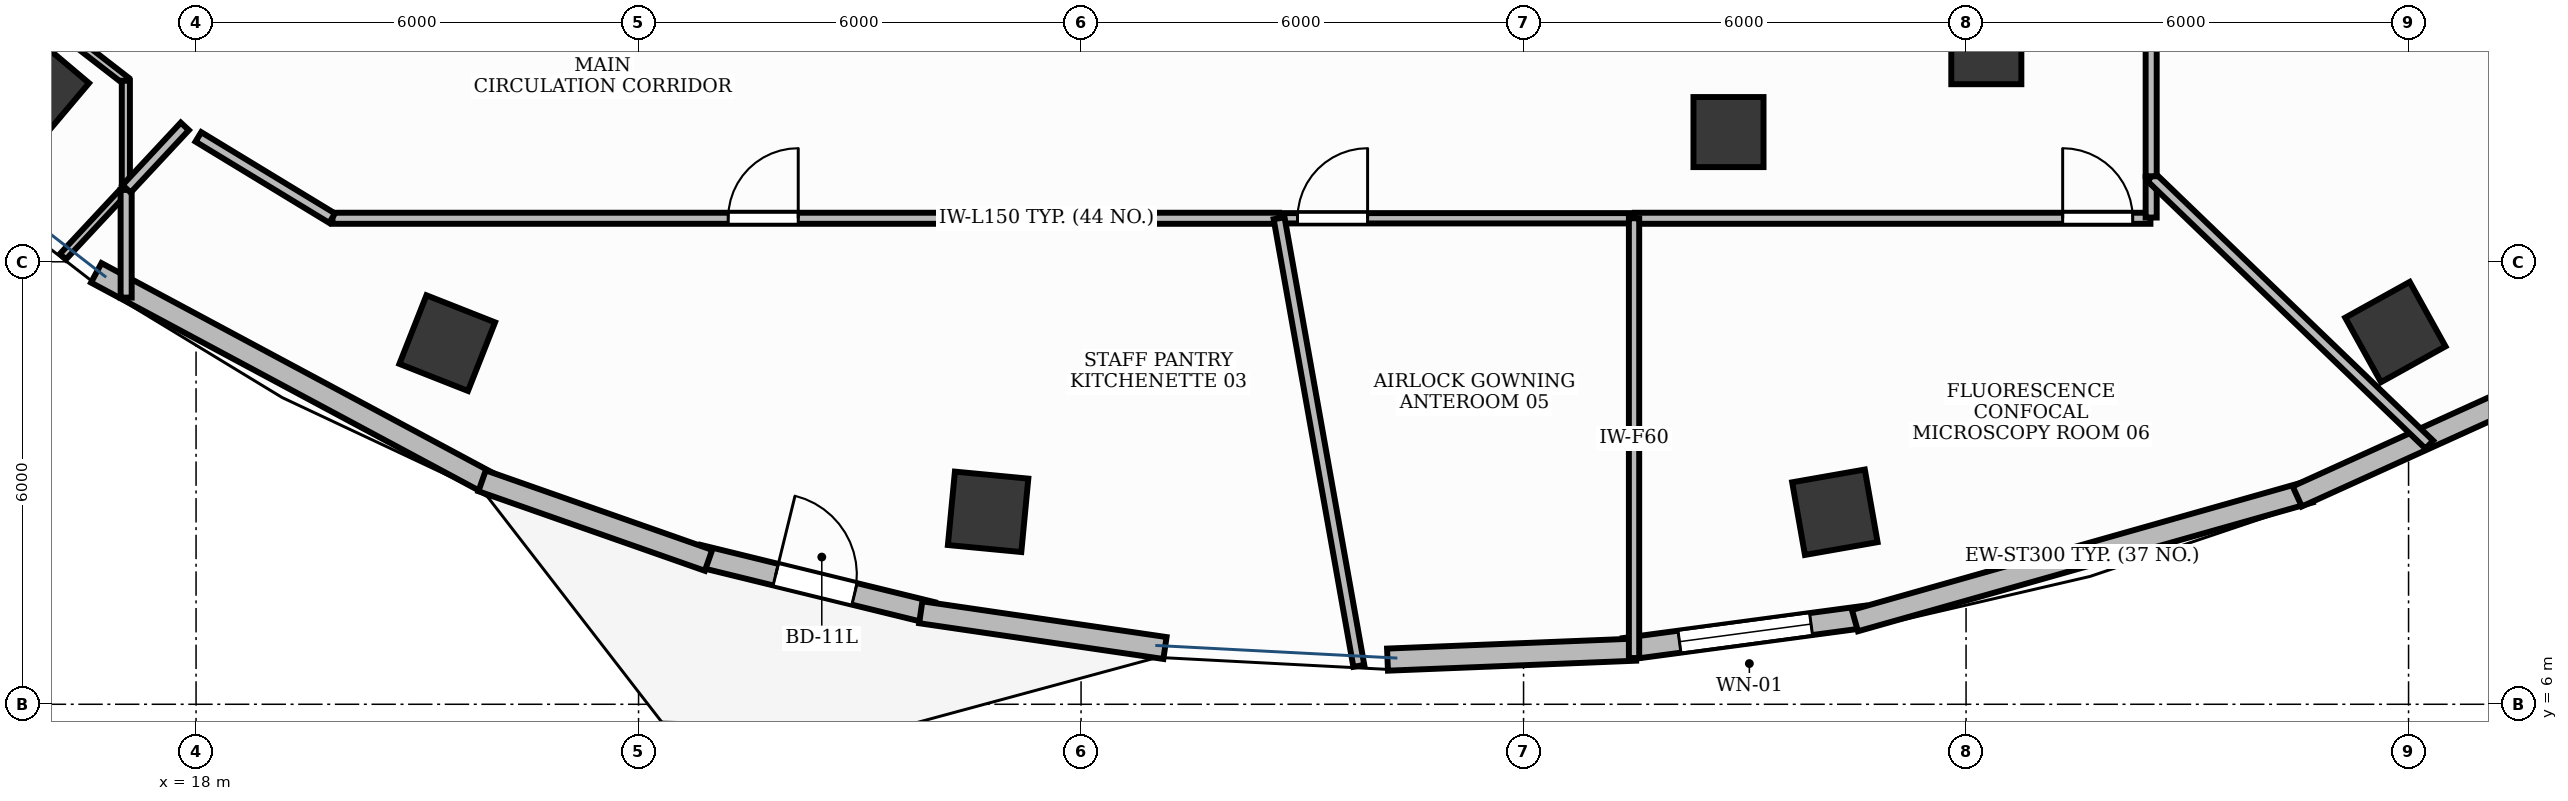
"""IFC4 building model, lengths in metres.
Left out: names, types, materials, properties, quantities, classifications, styles, units other than length and angle.
Written with IfcOpenShell. Run it as: python <this file> out.ifc"""

import sys

from ifc_helpers import new_model, si_unit, direction, frame, frame_2d, origin, origin_2d, place, context, subcontext, project, spatial, rectangle, extrude, element, fill, save


model = new_model("IFC4")
c1 = context("Model", 3, precision=1e-05, world=origin(), true_north=direction((0.0, 1.0)))
c2 = subcontext(c1, "Body", "Model", "MODEL_VIEW")
j1 = project(units=[si_unit("LENGTHUNIT", "METRE"), si_unit("PLANEANGLEUNIT", "RADIAN")], contexts=[c1])
p1 = place(None, origin())
s1 = spatial("IfcSite", under=j1, at=p1, CompositionType="ELEMENT")
p2 = place(p1, origin())
s2 = spatial("IfcBuilding", under=s1, at=p2, CompositionType="ELEMENT")
p3 = place(p2, frame((0.0, 0.0, 162.6)))
s3 = spatial("IfcBuildingStorey", under=s2, at=p3, CompositionType="ELEMENT", Elevation=162.6)
for number, where, z_axis, x_axis in (
    (1, (15.844, 14.363, -0.0), (0.0, 0.0, 1.0), (-0.764, 0.645, 0.0)),
    (2, (21.406, 10.897, -0.0), (0.0, 0.0, 1.0), (-0.93, 0.367, 0.0)),
    (3, (28.74, 8.61, -0.0), (0.0, 0.0, 1.0), (-0.995, 0.095, 0.0)),
    (4, (40.221, 8.604, -0.0), (0.0, 0.0, 1.0), (0.985, 0.173, 0.0)),
):
    element("IfcColumn", number, at=place(p3, frame(where, z_axis=z_axis, x_axis=x_axis)), inside=s3, PredefinedType="COLUMN", context=c2, shape_type="SweptSolid", body=[
        extrude(rectangle(XDim=1.0, YDim=1.0, at=origin_2d()), origin(), (0.0, 0.0, 1.0), 3.791),
    ])
p4 = place(p3, frame((38.779, 13.759, -0.0), z_axis=(0.0, 0.0, 1.0), x_axis=(1.0, 0.0, 0.0)))
e5 = element("IfcColumn", 5, at=p4, inside=s3, PredefinedType="COLUMN", context=c2, shape_type="SweptSolid", body=[
    extrude(rectangle(XDim=0.95, YDim=0.95, at=origin_2d()), origin(), (0.0, 0.0, 1.0), 3.791),
])
p5 = place(p3, frame((47.821, 11.047, -0.0), z_axis=(0.0, 0.0, 1.0), x_axis=(0.874535078577, 0.484962262797, 0.0)))
e6 = element("IfcColumn", 6, at=p5, inside=s3, PredefinedType="COLUMN", context=c2, shape_type="SweptSolid", body=[
    extrude(rectangle(XDim=1.0, YDim=1.0, at=origin_2d()), origin(), (0.0, 0.0, 1.0), 3.791),
])
p6 = place(p3, frame((42.275, 14.883, -0.0), z_axis=(0.0, 0.0, 1.0), x_axis=(1.0, 0.0, 0.0)))
e7 = element("IfcColumn", 7, at=p6, inside=s3, PredefinedType="COLUMN", context=c2, shape_type="SweptSolid", body=[
    extrude(rectangle(XDim=0.95, YDim=0.95, at=origin_2d()), origin(), (0.0, 0.0, 1.0), 3.791),
])
p7 = place(p3, frame((24.807, 8.016, 0.0), z_axis=(0.0, 0.0, 1.0), x_axis=(0.971312804689, -0.237805457142, 0.0)))
e8 = element("IfcWall", 8, at=p7, inside=s3, PredefinedType="STANDARD", context=c2, shape_type="SweptSolid", body=[
    extrude(rectangle(XDim=3.269, YDim=0.3, at=frame_2d((1.634, 0.0))), origin(), (0.0, 0.0, 1.0), 3.79),
])
p8 = place(p7, frame((1.084, 0.0, 0.0)))
e9 = element("IfcOpeningElement", 9, at=p8, cuts=e8, PredefinedType="OPENING", context=c2, shape_type="SweptSolid", body=[
    extrude(rectangle(XDim=1.1, YDim=2.15, at=frame_2d((0.55, 1.075))), frame((0.0, 0.165, 0.0), z_axis=(0.0, -1.0, 0.0), x_axis=(1.0, 0.0, 0.0)), (0.0, 0.0, 1.0), 0.33),
])
p9 = place(p3, frame((37.365, 6.748, 0.0), z_axis=(0.0, 0.0, 1.0), x_axis=(0.991139436205, 0.132825517122, 0.0)))
e10 = element("IfcWall", 10, at=p9, inside=s3, PredefinedType="STANDARD", context=c2, shape_type="SweptSolid", body=[
    extrude(rectangle(XDim=3.31, YDim=0.3, at=frame_2d((1.655, 0.0))), origin(), (0.0, 0.0, 1.0), 3.79),
])
p10 = place(p9, frame((0.755, 0.0, 0.9)))
e11 = element("IfcOpeningElement", 11, at=p10, cuts=e10, PredefinedType="OPENING", context=c2, shape_type="SweptSolid", body=[
    extrude(rectangle(XDim=1.8, YDim=2.1, at=frame_2d((0.9, 1.05))), frame((0.0, 0.165, 0.0), z_axis=(0.0, -1.0, 0.0), x_axis=(1.0, 0.0, 0.0)), (0.0, 0.0, 1.0), 0.33),
])
p11 = place(p3, frame((16.647, 11.85, 0.0), z_axis=(0.0, 0.0, 1.0), x_axis=(0.881364369565, -0.472437136624, 0.0)))
e12 = element("IfcWall", 12, at=p11, inside=s3, PredefinedType="STANDARD", context=c2, shape_type="SweptSolid", body=[
    extrude(rectangle(XDim=6.124, YDim=0.3, at=frame_2d((3.062, 0.0))), origin(), (0.0, 0.0, 1.0), 3.79),
])
p12 = place(p3, frame((21.878, 9.03, 0.0), z_axis=(0.0, 0.0, 1.0), x_axis=(0.94352100271, -0.331312718509, 0.0)))
e13 = element("IfcWall", 13, at=p12, inside=s3, PredefinedType="STANDARD", context=c2, shape_type="SweptSolid", body=[
    extrude(rectangle(XDim=3.254, YDim=0.3, at=frame_2d((1.627, 0.0))), origin(), (0.0, 0.0, 1.0), 3.79),
])
p13 = place(p3, frame((27.826, 7.247, 0.0), z_axis=(0.0, 0.0, 1.0), x_axis=(0.98945927954, -0.144811374319, 0.0)))
e14 = element("IfcWall", 14, at=p13, inside=s3, PredefinedType="STANDARD", context=c2, shape_type="SweptSolid", body=[
    extrude(rectangle(XDim=3.346, YDim=0.3, at=frame_2d((1.673, 0.0))), origin(), (0.0, 0.0, 1.0), 3.79),
])
p14 = place(p3, frame((34.155, 6.605, 0.0), z_axis=(0.0, 0.0, 1.0), x_axis=(0.999190386434, 0.040231475948, 0.0)))
e15 = element("IfcWall", 15, at=p14, inside=s3, PredefinedType="STANDARD", context=c2, shape_type="SweptSolid", body=[
    extrude(rectangle(XDim=3.368, YDim=0.3, at=frame_2d((1.684, 0.0))), origin(), (0.0, 0.0, 1.0), 3.79),
])
p15 = place(p3, frame((40.493, 7.134, 0.0), z_axis=(0.0, 0.0, 1.0), x_axis=(0.962163849422, 0.272471515694, 0.0)))
e16 = element("IfcWall", 16, at=p15, inside=s3, PredefinedType="STANDARD", context=c2, shape_type="SweptSolid", body=[
    extrude(rectangle(XDim=6.409, YDim=0.3, at=frame_2d((3.205, 0.0))), origin(), (0.0, 0.0, 1.0), 3.79),
])
p16 = place(p3, frame((46.49, 8.818, 0.0), z_axis=(0.0, 0.0, 1.0), x_axis=(0.910633193525, 0.413215666268, 0.0)))
e17 = element("IfcWall", 17, at=p16, inside=s3, PredefinedType="STANDARD", context=c2, shape_type="SweptSolid", body=[
    extrude(rectangle(XDim=3.195, YDim=0.3, at=frame_2d((1.598, 0.0))), origin(), (0.0, 0.0, 1.0), 3.79),
])
p17 = place(p3, frame((19.85, 12.59, 0.0), z_axis=(0.0, 0.0, 1.0), x_axis=(1.0, 0.0, 0.0)))
e18 = element("IfcWall", 18, at=p17, inside=s3, PredefinedType="PARTITIONING", context=c2, shape_type="SweptSolid", body=[
    extrude(rectangle(XDim=12.835, YDim=0.15, at=frame_2d((6.418, 0.0))), origin(), (0.0, 0.0, 1.0), 2.8),
])
p18 = place(p17, frame((5.365, 0.0, 0.0)))
e19 = element("IfcOpeningElement", 19, at=p18, cuts=e18, PredefinedType="OPENING", context=c2, shape_type="SweptSolid", body=[
    extrude(rectangle(XDim=0.95, YDim=2.15, at=frame_2d((0.475, 1.075))), frame((0.0, 0.09, 0.0), z_axis=(0.0, -1.0, 0.0), x_axis=(1.0, 0.0, 0.0)), (0.0, 0.0, 1.0), 0.18),
])
p19 = place(p3, frame((32.695, 12.59, 0.0), z_axis=(0.0, 0.0, 1.0), x_axis=(1.0, 0.0, 0.0)))
e20 = element("IfcWall", 20, at=p19, inside=s3, PredefinedType="PARTITIONING", context=c2, shape_type="SweptSolid", body=[
    extrude(rectangle(XDim=4.803, YDim=0.14, at=frame_2d((2.401, 0.0))), origin(), (0.0, 0.0, 1.0), 2.8),
])
p20 = place(p19, frame((0.24, 0.0, 0.0)))
e21 = element("IfcOpeningElement", 21, at=p20, cuts=e20, PredefinedType="OPENING", context=c2, shape_type="SweptSolid", body=[
    extrude(rectangle(XDim=0.95, YDim=2.15, at=frame_2d((0.475, 1.075))), frame((0.0, 0.085, 0.0), z_axis=(0.0, -1.0, 0.0), x_axis=(1.0, 0.0, 0.0)), (0.0, 0.0, 1.0), 0.17),
])
p21 = place(p3, frame((37.508, 12.59, 0.0), z_axis=(0.0, 0.0, 1.0), x_axis=(1.0, 0.0, 0.0)))
e22 = element("IfcWall", 22, at=p21, inside=s3, PredefinedType="PARTITIONING", context=c2, shape_type="SweptSolid", body=[
    extrude(rectangle(XDim=6.992, YDim=0.15, at=frame_2d((3.496, 0.0))), origin(), (0.0, 0.0, 1.0), 2.8),
])
p22 = place(p21, frame((5.802, 0.0, 0.0)))
e23 = element("IfcOpeningElement", 23, at=p22, cuts=e22, PredefinedType="OPENING", context=c2, shape_type="SweptSolid", body=[
    extrude(rectangle(XDim=0.95, YDim=2.15, at=frame_2d((0.475, 1.075))), frame((0.0, 0.09, 0.0), z_axis=(0.0, -1.0, 0.0), x_axis=(1.0, 0.0, 0.0)), (0.0, 0.0, 1.0), 0.18),
])
p23 = place(p3, frame((15.995, 15.271, 0.0), z_axis=(0.0, 0.0, 1.0), x_axis=(0.790603531082, -0.612328389543, 0.0)))
e24 = element("IfcWall", 24, at=p23, inside=s3, PredefinedType="MOVABLE", context=c2, shape_type="SweptSolid", body=[
    extrude(rectangle(XDim=1.333, YDim=0.11, at=frame_2d((0.666, 0.0))), origin(), (0.0, 0.0, 1.0), 2.8),
])
p24 = place(p3, frame((17.048, 14.455, 0.0), z_axis=(0.0, 0.0, 1.0), x_axis=(0.0, -1.0, 0.0)))
e25 = element("IfcWall", 25, at=p24, inside=s3, PredefinedType="MOVABLE", context=c2, shape_type="SweptSolid", body=[
    extrude(rectangle(XDim=1.47, YDim=0.11, at=frame_2d((0.735, 0.0))), origin(), (0.0, 0.0, 1.0), 2.8),
])
p25 = place(p3, frame((17.048, 12.984, 0.0), z_axis=(0.0, 0.0, 1.0), x_axis=(-0.681894093702, -0.731450917679, 0.0)))
e26 = element("IfcWall", 26, at=p25, inside=s3, PredefinedType="MOVABLE", context=c2, shape_type="SweptSolid", body=[
    extrude(rectangle(XDim=1.251, YDim=0.11, at=frame_2d((0.625, 0.0))), origin(), (0.0, 0.0, 1.0), 2.8),
])
p26 = place(p3, frame((18.031, 13.694, 0.0), z_axis=(0.0, 0.0, 1.0), x_axis=(0.85454497186, -0.51937740716, 0.0)))
e27 = element("IfcWall", 27, at=p26, inside=s3, PredefinedType="PARTITIONING", context=c2, shape_type="SweptSolid", body=[
    extrude(rectangle(XDim=2.122, YDim=0.15, at=frame_2d((1.061, 0.0))), origin(), (0.0, 0.0, 1.0), 2.8),
])
p27 = place(p3, frame((32.685, 12.59, 0.0), z_axis=(0.0, 0.0, 1.0), x_axis=(0.175350659772, -0.984506041687, 0.0)))
e28 = element("IfcWall", 28, at=p27, inside=s3, PredefinedType="PARTITIONING", context=c2, shape_type="SweptSolid", body=[
    extrude(rectangle(XDim=6.165, YDim=0.15, at=frame_2d((3.083, 0.0))), origin(), (0.0, 0.0, 1.0), 2.8),
])
p28 = place(p3, frame((17.052, 11.514, 0.0), z_axis=(0.0, 0.0, 1.0), x_axis=(0.0, 1.0, 0.0)))
e29 = element("IfcWall", 29, at=p28, inside=s3, PredefinedType="PARTITIONING", context=c2, shape_type="SweptSolid", body=[
    extrude(rectangle(XDim=1.46, YDim=0.15, at=frame_2d((0.73, 0.0))), origin(), (0.0, 0.0, 1.0), 2.8),
])
p29 = place(p3, frame((17.058, 12.99, 0.0), z_axis=(0.0, 0.0, 1.0), x_axis=(0.681994997266, 0.731356837464, 0.0)))
e30 = element("IfcWall", 30, at=p29, inside=s3, PredefinedType="PARTITIONING", context=c2, shape_type="SweptSolid", body=[
    extrude(rectangle(XDim=1.157, YDim=0.15, at=frame_2d((0.579, 0.0))), origin(), (0.0, 0.0, 1.0), 2.8),
])
p30 = place(p3, frame((37.498, 12.59, 0.0), z_axis=(0.0, 0.0, 1.0), x_axis=(0.0, -1.0, 0.0)))
e31 = element("IfcWall", 31, at=p30, inside=s3, PredefinedType="PARTITIONING", context=c2, shape_type="SweptSolid", body=[
    extrude(rectangle(XDim=5.963, YDim=0.14, at=frame_2d((2.981, 0.0))), origin(), (0.0, 0.0, 1.0), 2.8),
])
p31 = place(p3, frame((44.51, 12.6, 0.0), z_axis=(0.0, 0.0, 1.0), x_axis=(0.0, 1.0, 0.0)))
e32 = element("IfcWall", 32, at=p31, inside=s3, PredefinedType="PARTITIONING", context=c2, shape_type="SweptSolid", body=[
    extrude(rectangle(XDim=0.55, YDim=0.15, at=frame_2d((0.275, 0.0))), origin(), (0.0, 0.0, 1.0), 2.8),
])
p32 = place(p3, frame((44.51, 13.15, 0.0), z_axis=(0.0, 0.0, 1.0), x_axis=(0.720549773239, -0.69340321912, 0.0)))
e33 = element("IfcWall", 33, at=p32, inside=s3, PredefinedType="PARTITIONING", context=c2, shape_type="SweptSolid", body=[
    extrude(rectangle(XDim=5.234, YDim=0.15, at=frame_2d((2.617, 0.0))), origin(), (0.0, 0.0, 1.0), 2.8),
])
p33 = place(p3, frame((44.51, 13.16, 0.0), z_axis=(0.0, 0.0, 1.0), x_axis=(0.0, 1.0, 0.0)))
e34 = element("IfcWall", 34, at=p33, inside=s3, PredefinedType="PARTITIONING", context=c2, shape_type="SweptSolid", body=[
    extrude(rectangle(XDim=3.24, YDim=0.15, at=frame_2d((1.62, 0.0))), origin(), (0.0, 0.0, 1.0), 2.8),
])
p34 = place(p8, origin())
e35 = element("IfcDoor", 35, at=p34, inside=s3, OperationType="SINGLE_SWING_LEFT", PredefinedType="DOOR", context=c2, shape_type="SweptSolid", body=[
    extrude(rectangle(XDim=1.1, YDim=2.15, at=frame_2d((0.55, 1.075))), frame((0.0, 0.025, 0.0), z_axis=(0.0, -1.0, 0.0), x_axis=(1.0, 0.0, 0.0)), (0.0, 0.0, 1.0), 0.05),
])
fill(e9, e35)
p35 = place(p10, origin())
e36 = element("IfcWindow", 36, at=p35, inside=s3, PartitioningType="SINGLE_PANEL", PredefinedType="WINDOW", context=c2, shape_type="SweptSolid", body=[
    extrude(rectangle(XDim=1.8, YDim=2.1, at=frame_2d((0.9, 1.05))), frame((0.0, 0.03, 0.0), z_axis=(0.0, -1.0, 0.0), x_axis=(1.0, 0.0, 0.0)), (0.0, 0.0, 1.0), 0.06),
])
fill(e11, e36)
p36 = place(p18, origin())
e37 = element("IfcDoor", 37, at=p36, inside=s3, OperationType="SINGLE_SWING_RIGHT", PredefinedType="DOOR", context=c2, shape_type="SweptSolid", body=[
    extrude(rectangle(XDim=0.95, YDim=2.15, at=frame_2d((0.475, 1.075))), frame((0.0, 0.025, 0.0), z_axis=(0.0, -1.0, 0.0), x_axis=(1.0, 0.0, 0.0)), (0.0, 0.0, 1.0), 0.05),
])
fill(e19, e37)
p37 = place(p20, origin())
e38 = element("IfcDoor", 38, at=p37, inside=s3, OperationType="SINGLE_SWING_RIGHT", PredefinedType="DOOR", context=c2, shape_type="SweptSolid", body=[
    extrude(rectangle(XDim=0.95, YDim=2.15, at=frame_2d((0.475, 1.075))), frame((0.0, 0.025, 0.0), z_axis=(0.0, -1.0, 0.0), x_axis=(1.0, 0.0, 0.0)), (0.0, 0.0, 1.0), 0.05),
])
fill(e21, e38)
p38 = place(p22, origin())
e39 = element("IfcDoor", 39, at=p38, inside=s3, OperationType="SINGLE_SWING_LEFT", PredefinedType="DOOR", context=c2, shape_type="SweptSolid", body=[
    extrude(rectangle(XDim=0.95, YDim=2.15, at=frame_2d((0.475, 1.075))), frame((0.0, 0.025, 0.0), z_axis=(0.0, -1.0, 0.0), x_axis=(1.0, 0.0, 0.0)), (0.0, 0.0, 1.0), 0.05),
])
fill(e23, e39)
save(model, sys.argv[1])
